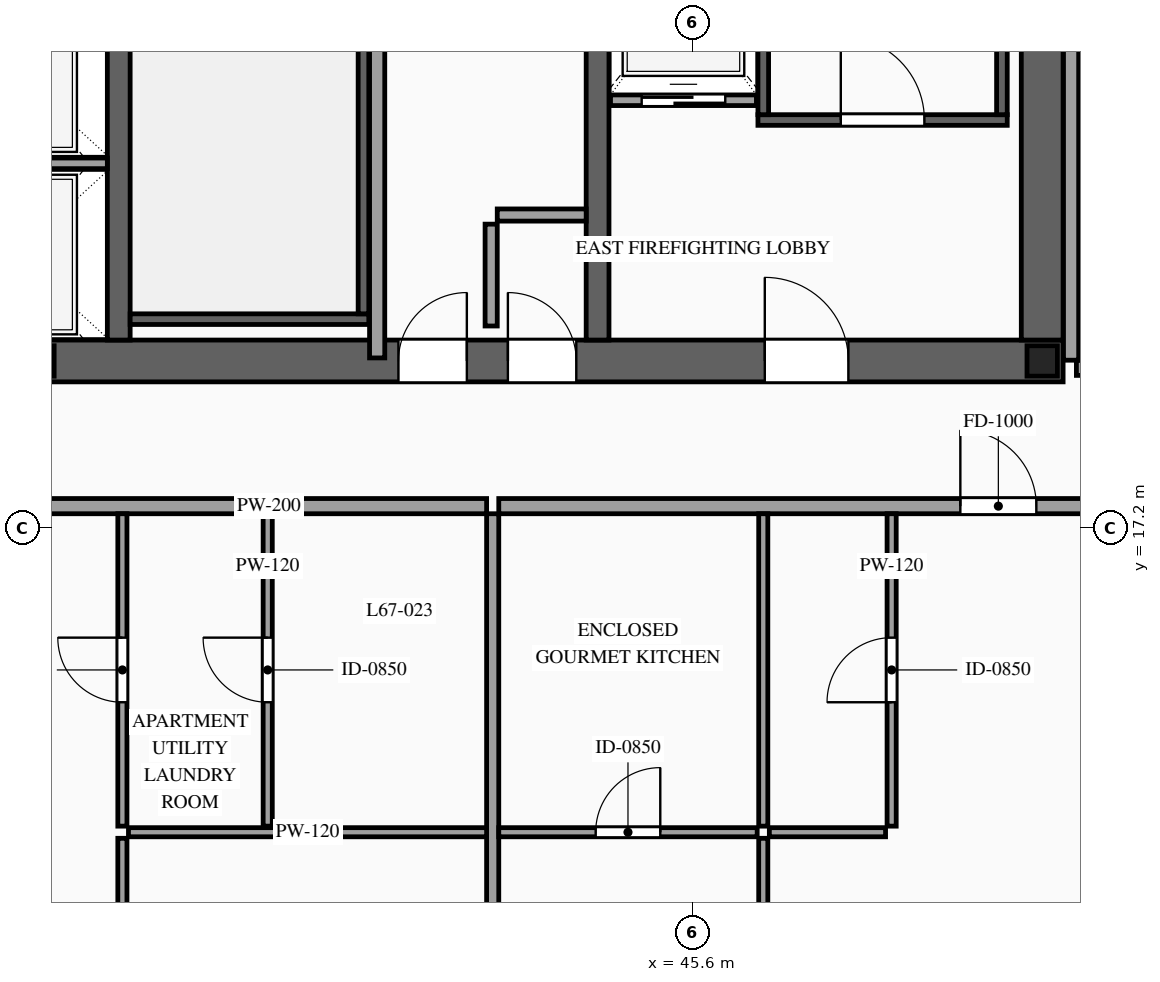
"""IFC4 building model, lengths in metres.
Left out: names, types, materials, properties, quantities, classifications, styles, units other than length and angle.
Written with IfcOpenShell. Run it as: python <this file> out.ifc"""

import sys

from ifc_helpers import new_model, si_unit, direction, frame, frame_2d, origin, origin_2d, place, context, subcontext, project, spatial, rectangle, i_section, extrude, source, transform, mapped, element, fill, save


model = new_model("IFC4")
c1 = context("Model", 3, precision=1e-05, world=origin(), true_north=direction((0.0, 1.0)))
c2 = subcontext(c1, "Body", "Model", "MODEL_VIEW")
j1 = project(units=[si_unit("LENGTHUNIT", "METRE"), si_unit("PLANEANGLEUNIT", "RADIAN")], contexts=[c1])
p1 = place(None, origin())
s1 = spatial("IfcSite", under=j1, at=p1, CompositionType="ELEMENT")
p2 = place(p1, origin())
s2 = spatial("IfcBuilding", under=s1, at=p2, CompositionType="ELEMENT")
p3 = place(p2, frame((0.0, 0.0, 252.1)))
s3 = spatial("IfcBuildingStorey", under=s2, at=p3, CompositionType="ELEMENT", Elevation=252.1)
p4 = place(p3, frame((23.525, 19.4, 0.0), z_axis=(0.0, 0.0, 1.0), x_axis=(1.0, 0.0, 0.0)))
e1 = element("IfcWall", 1, at=p4, inside=s3, PredefinedType="SHEAR", context=c2, shape_type="SweptSolid", body=[
    extrude(rectangle(XDim=26.95, YDim=0.55, at=frame_2d((13.475, 0.0))), origin(), (0.0, 0.0, 1.0), 3.5),
])
p5 = place(p4, frame((1.925, 0.0, 0.0)))
e2 = element("IfcOpeningElement", 2, at=p5, cuts=e1, PredefinedType="OPENING", context=c2, shape_type="SweptSolid", body=[
    extrude(rectangle(XDim=1.1, YDim=2.2, at=frame_2d((0.55, 1.1))), frame((0.0, 0.29, 0.0), z_axis=(0.0, -1.0, 0.0), x_axis=(1.0, 0.0, 0.0)), (0.0, 0.0, 1.0), 0.58),
])
p6 = place(p4, frame((9.825, 0.0, 0.0)))
e3 = element("IfcOpeningElement", 3, at=p6, cuts=e1, PredefinedType="OPENING", context=c2, shape_type="SweptSolid", body=[
    extrude(rectangle(XDim=1.1, YDim=2.2, at=frame_2d((0.55, 1.1))), frame((0.0, 0.29, 0.0), z_axis=(0.0, -1.0, 0.0), x_axis=(1.0, 0.0, 0.0)), (0.0, 0.0, 1.0), 0.58),
])
p7 = place(p4, frame((23.025, 0.0, 0.0)))
e4 = element("IfcOpeningElement", 4, at=p7, cuts=e1, PredefinedType="OPENING", context=c2, shape_type="SweptSolid", body=[
    extrude(rectangle(XDim=1.1, YDim=2.2, at=frame_2d((0.55, 1.1))), frame((0.0, 0.29, 0.0), z_axis=(0.0, -1.0, 0.0), x_axis=(1.0, 0.0, 0.0)), (0.0, 0.0, 1.0), 0.58),
])
p8 = place(p4, frame((19.645, 0.0, 0.0)))
e5 = element("IfcOpeningElement", 5, at=p8, cuts=e1, PredefinedType="OPENING", context=c2, shape_type="SweptSolid", body=[
    extrude(rectangle(XDim=0.9, YDim=2.15, at=frame_2d((0.45, 1.075))), frame((0.0, 0.29, 0.0), z_axis=(0.0, -1.0, 0.0), x_axis=(1.0, 0.0, 0.0)), (0.0, 0.0, 1.0), 0.58),
])
p9 = place(p4, frame((18.205, 0.0, 0.0)))
e6 = element("IfcOpeningElement", 6, at=p9, cuts=e1, PredefinedType="OPENING", context=c2, shape_type="SweptSolid", body=[
    extrude(rectangle(XDim=0.9, YDim=2.15, at=frame_2d((0.45, 1.075))), frame((0.0, 0.29, 0.0), z_axis=(0.0, -1.0, 0.0), x_axis=(1.0, 0.0, 0.0)), (0.0, 0.0, 1.0), 0.58),
])
m1 = source(origin(), c2, "Body", "SweptSolid", [
    extrude(rectangle(XDim=12.25, YDim=0.55, at=frame_2d((6.125, 0.0))), origin(), (0.0, 0.0, 1.0), 3.5),
])
p10 = place(p3, frame((50.2, 19.675, 0.0), z_axis=(0.0, 0.0, 1.0), x_axis=(0.0, 1.0, 0.0)))
e7 = element("IfcWall", 7, at=p10, inside=s3, PredefinedType="SHEAR", context=c2, shape_type="MappedRepresentation", body=[
    mapped(m1, transform((0.0, 0.0, 0.0), scale=1.0)),
])
m2 = source(origin(), c2, "Body", "SweptSolid", [
    extrude(rectangle(XDim=12.25, YDim=0.3, at=frame_2d((6.125, 0.0))), origin(), (0.0, 0.0, 1.0), 3.5),
])
for number, where, z_axis, x_axis in (
    (8, (38.05, 19.675, 0.0), (0.0, 0.0, 1.0), (0.0, 1.0, 0.0)),
    (9, (44.35, 19.675, 0.0), (0.0, 0.0, 1.0), (0.0, 1.0, 0.0)),
):
    element("IfcWall", number, at=place(p3, frame(where, z_axis=z_axis, x_axis=x_axis)), inside=s3, PredefinedType="SOLIDWALL", context=c2, shape_type="MappedRepresentation", body=[
        mapped(m2, transform((0.0, 0.0, 0.0), scale=1.0)),
    ])
m3 = source(origin(), c2, "Body", "SweptSolid", [
    extrude(i_section(OverallWidth=0.4, OverallDepth=0.4, WebThickness=0.013, FlangeThickness=0.021, at=origin_2d()), origin(), (0.0, 0.0, 1.0), 3.5),
])
for number, where, z_axis, x_axis in (
    (10, (37.0, 19.4, 0.0), (0.0, 0.0, 1.0), (1.0, 0.0, 0.0)),
    (11, (50.2, 19.4, 0.0), (0.0, 0.0, 1.0), (1.0, 0.0, 0.0)),
):
    element("IfcColumn", number, at=place(p3, frame(where, z_axis=z_axis, x_axis=x_axis)), inside=s3, PredefinedType="COLUMN", context=c2, shape_type="MappedRepresentation", body=[
        mapped(m3, transform((0.0, 0.0, 0.0), scale=1.0)),
    ])
p11 = place(p3, frame((44.52, 22.83, 0.0), z_axis=(0.0, 0.0, 1.0), x_axis=(1.0, 0.0, 0.0)))
e12 = element("IfcWall", 12, at=p11, inside=s3, PredefinedType="SOLIDWALL", context=c2, shape_type="SweptSolid", body=[
    extrude(rectangle(XDim=1.92, YDim=0.14, at=frame_2d((0.96, 0.0))), origin(), (0.0, 0.0, 1.0), 3.28),
])
p12 = place(p11, frame((0.41, 0.0, 0.0)))
e13 = element("IfcOpeningElement", 13, at=p12, cuts=e12, PredefinedType="OPENING", context=c2, shape_type="SweptSolid", body=[
    extrude(rectangle(XDim=1.1, YDim=2.2, at=frame_2d((0.55, 1.1))), frame((0.0, 0.085, 0.0), z_axis=(0.0, -1.0, 0.0), x_axis=(1.0, 0.0, 0.0)), (0.0, 0.0, 1.0), 0.17),
])
m4 = source(origin(), c2, "Body", "SweptSolid", [
    extrude(rectangle(XDim=2.4, YDim=0.14, at=frame_2d((1.2, 0.0))), origin(), (0.0, 0.0, 1.0), 3.28),
])
p13 = place(p3, frame((35.5, 22.0, 0.0), z_axis=(0.0, 0.0, 1.0), x_axis=(1.0, 0.0, 0.0)))
e14 = element("IfcWall", 14, at=p13, inside=s3, PredefinedType="SOLIDWALL", context=c2, shape_type="MappedRepresentation", body=[
    mapped(m4, transform((0.0, 0.0, 0.0), scale=1.0)),
])
p14 = place(p3, frame((46.46, 22.57, 0.0), z_axis=(0.0, 0.0, 1.0), x_axis=(1.0, 0.0, 0.0)))
e15 = element("IfcWall", 15, at=p14, inside=s3, PredefinedType="SOLIDWALL", context=c2, shape_type="SweptSolid", body=[
    extrude(rectangle(XDim=3.28, YDim=0.14, at=frame_2d((1.64, 0.0))), origin(), (0.0, 0.0, 1.0), 3.28),
])
p15 = place(p14, frame((1.09, 0.0, 0.0)))
e16 = element("IfcOpeningElement", 16, at=p15, cuts=e15, PredefinedType="OPENING", context=c2, shape_type="SweptSolid", body=[
    extrude(rectangle(XDim=1.1, YDim=2.2, at=frame_2d((0.55, 1.1))), frame((0.0, 0.085, 0.0), z_axis=(0.0, -1.0, 0.0), x_axis=(1.0, 0.0, 0.0)), (0.0, 0.0, 1.0), 0.17),
])
m5 = source(origin(), c2, "Body", "SweptSolid", [
    extrude(rectangle(XDim=8.94, YDim=0.14, at=frame_2d((4.47, 0.0))), origin(), (0.0, 0.0, 1.0), 3.28),
])
for number, where, z_axis, x_axis in (
    (17, (46.53, 22.64, 0.0), (0.0, 0.0, 1.0), (0.0, 1.0, 0.0)),
    (18, (49.67, 22.64, 0.0), (0.0, 0.0, 1.0), (0.0, 1.0, 0.0)),
):
    element("IfcWall", number, at=place(p3, frame(where, z_axis=z_axis, x_axis=x_axis)), inside=s3, PredefinedType="SOLIDWALL", context=c2, shape_type="MappedRepresentation", body=[
        mapped(m5, transform((0.0, 0.0, 0.0), scale=1.0)),
    ])
m6 = source(origin(), c2, "Body", "SweptSolid", [
    extrude(rectangle(XDim=3.14, YDim=0.14, at=frame_2d((1.57, 0.0))), origin(), (0.0, 0.0, 1.0), 3.28),
])
p16 = place(p3, frame((38.2, 19.95, 0.0), z_axis=(0.0, 0.0, 1.0), x_axis=(1.0, 0.0, 0.0)))
e19 = element("IfcWall", 19, at=p16, inside=s3, PredefinedType="SOLIDWALL", context=c2, shape_type="MappedRepresentation", body=[
    mapped(m6, transform((0.0, 0.0, 0.0), scale=1.0)),
])
m7 = source(origin(), c2, "Body", "SweptSolid", [
    extrude(rectangle(XDim=8.94, YDim=0.14, at=frame_2d((4.47, 0.0))), origin(), (0.0, 0.0, 1.0), 3.28),
])
p17 = place(p3, frame((41.27, 20.02, 0.0), z_axis=(0.0, 0.0, 1.0), x_axis=(0.0, 1.0, 0.0)))
e20 = element("IfcWall", 20, at=p17, inside=s3, PredefinedType="SOLIDWALL", context=c2, shape_type="MappedRepresentation", body=[
    mapped(m7, transform((0.0, 0.0, 0.0), scale=1.0)),
])
m8 = source(origin(), c2, "Body", "SweptSolid", [
    extrude(rectangle(XDim=1.34, YDim=0.16, at=frame_2d((0.67, 0.0))), origin(), (0.0, 0.0, 1.0), 3.28),
])
p18 = place(p3, frame((42.95, 19.86, 0.0), z_axis=(0.0, 0.0, 1.0), x_axis=(0.0, 1.0, 0.0)))
e21 = element("IfcWall", 21, at=p18, inside=s3, PredefinedType="PARTITIONING", context=c2, shape_type="MappedRepresentation", body=[
    mapped(m8, transform((0.0, 0.0, 0.0), scale=1.0)),
])
m9 = source(origin(), c2, "Body", "SweptSolid", [
    extrude(rectangle(XDim=1.17, YDim=0.16, at=frame_2d((0.585, 0.0))), origin(), (0.0, 0.0, 1.0), 3.28),
])
p19 = place(p3, frame((43.03, 21.32, 0.0), z_axis=(0.0, 0.0, 1.0), x_axis=(1.0, 0.0, 0.0)))
e22 = element("IfcWall", 22, at=p19, inside=s3, PredefinedType="PARTITIONING", context=c2, shape_type="MappedRepresentation", body=[
    mapped(m9, transform((0.0, 0.0, 0.0), scale=1.0)),
])
m10 = source(origin(), c2, "Body", "SweptSolid", [
    extrude(rectangle(XDim=12.72, YDim=0.2, at=frame_2d((6.36, 0.0))), origin(), (0.0, 0.0, 1.0), 3.28),
])
p20 = place(p3, frame((41.45, 19.44, 0.0), z_axis=(0.0, 0.0, 1.0), x_axis=(0.0, 1.0, 0.0)))
e23 = element("IfcWall", 23, at=p20, inside=s3, PredefinedType="PARTITIONING", context=c2, shape_type="MappedRepresentation", body=[
    mapped(m10, transform((0.0, 0.0, 0.0), scale=1.0)),
])
p21 = place(p3, frame((31.11, 17.49, 0.0), z_axis=(0.0, 0.0, 1.0), x_axis=(1.0, 0.0, 0.0)))
e24 = element("IfcWall", 24, at=p21, inside=s3, PredefinedType="PARTITIONING", context=c2, shape_type="SweptSolid", body=[
    extrude(rectangle(XDim=11.78, YDim=0.2, at=frame_2d((5.89, 0.0))), origin(), (0.0, 0.0, 1.0), 3.28),
])
p22 = place(p21, frame((4.801, 0.0, 0.0)))
e25 = element("IfcOpeningElement", 25, at=p22, cuts=e24, PredefinedType="OPENING", context=c2, shape_type="SweptSolid", body=[
    extrude(rectangle(XDim=1.0, YDim=2.2, at=frame_2d((0.5, 1.1))), frame((0.0, 0.115, 0.0), z_axis=(0.0, -1.0, 0.0), x_axis=(1.0, 0.0, 0.0)), (0.0, 0.0, 1.0), 0.23),
])
m11 = source(origin(), c2, "Body", "SweptSolid", [
    extrude(rectangle(XDim=12.04, YDim=0.16, at=frame_2d((6.02, 0.0))), origin(), (0.0, 0.0, 1.0), 3.28),
])
p23 = place(p3, frame((42.97, 5.35, 0.0), z_axis=(0.0, 0.0, 1.0), x_axis=(0.0, 1.0, 0.0)))
e26 = element("IfcWall", 26, at=p23, inside=s3, PredefinedType="PARTITIONING", context=c2, shape_type="MappedRepresentation", body=[
    mapped(m11, transform((0.0, 0.0, 0.0), scale=1.0)),
])
p24 = place(p3, frame((40.01, 13.28, 0.0), z_axis=(0.0, 0.0, 1.0), x_axis=(0.0, 1.0, 0.0)))
e27 = element("IfcWall", 27, at=p24, inside=s3, PredefinedType="PARTITIONING", context=c2, shape_type="SweptSolid", body=[
    extrude(rectangle(XDim=4.11, YDim=0.12, at=frame_2d((2.055, 0.0))), origin(), (0.0, 0.0, 1.0), 3.28),
])
p25 = place(p24, frame((1.63, 0.0, 0.0)))
e28 = element("IfcOpeningElement", 28, at=p25, cuts=e27, PredefinedType="OPENING", context=c2, shape_type="SweptSolid", body=[
    extrude(rectangle(XDim=0.85, YDim=2.1, at=frame_2d((0.425, 1.05))), frame((0.0, 0.075, 0.0), z_axis=(0.0, -1.0, 0.0), x_axis=(1.0, 0.0, 0.0)), (0.0, 0.0, 1.0), 0.15),
])
m12 = source(origin(), c2, "Body", "SweptSolid", [
    extrude(rectangle(XDim=4.712, YDim=0.12, at=frame_2d((2.356, 0.0))), origin(), (0.0, 0.0, 1.0), 3.28),
])
p26 = place(p3, frame((38.178, 13.2, 0.0), z_axis=(0.0, 0.0, 1.0), x_axis=(1.0, 0.0, 0.0)))
e29 = element("IfcWall", 29, at=p26, inside=s3, PredefinedType="PARTITIONING", context=c2, shape_type="MappedRepresentation", body=[
    mapped(m12, transform((0.0, 0.0, 0.0), scale=1.0)),
])
p27 = place(p3, frame((38.098, 5.35, 0.0), z_axis=(0.0, 0.0, 1.0), x_axis=(0.0, 1.0, 0.0)))
e30 = element("IfcWall", 30, at=p27, inside=s3, PredefinedType="PARTITIONING", context=c2, shape_type="SweptSolid", body=[
    extrude(rectangle(XDim=7.77, YDim=0.12, at=frame_2d((3.885, 0.0))), origin(), (0.0, 0.0, 1.0), 3.28),
])
p28 = place(p27, frame((3.435, 0.0, 0.0)))
e31 = element("IfcOpeningElement", 31, at=p28, cuts=e30, PredefinedType="OPENING", context=c2, shape_type="SweptSolid", body=[
    extrude(rectangle(XDim=0.9, YDim=2.15, at=frame_2d((0.45, 1.075))), frame((0.0, 0.075, 0.0), z_axis=(0.0, -1.0, 0.0), x_axis=(1.0, 0.0, 0.0)), (0.0, 0.0, 1.0), 0.15),
])
p29 = place(p3, frame((38.098, 13.28, 0.0), z_axis=(0.0, 0.0, 1.0), x_axis=(0.0, 1.0, 0.0)))
e32 = element("IfcWall", 32, at=p29, inside=s3, PredefinedType="PARTITIONING", context=c2, shape_type="SweptSolid", body=[
    extrude(rectangle(XDim=4.11, YDim=0.12, at=frame_2d((2.055, 0.0))), origin(), (0.0, 0.0, 1.0), 3.28),
])
p30 = place(p29, frame((1.63, 0.0, 0.0)))
e33 = element("IfcOpeningElement", 33, at=p30, cuts=e32, PredefinedType="OPENING", context=c2, shape_type="SweptSolid", body=[
    extrude(rectangle(XDim=0.85, YDim=2.1, at=frame_2d((0.425, 1.05))), frame((0.0, 0.075, 0.0), z_axis=(0.0, -1.0, 0.0), x_axis=(1.0, 0.0, 0.0)), (0.0, 0.0, 1.0), 0.15),
])
p31 = place(p3, frame((43.05, 17.49, 0.0), z_axis=(0.0, 0.0, 1.0), x_axis=(1.0, 0.0, 0.0)))
e34 = element("IfcWall", 34, at=p31, inside=s3, PredefinedType="PARTITIONING", context=c2, shape_type="SweptSolid", body=[
    extrude(rectangle(XDim=11.51, YDim=0.2, at=frame_2d((5.755, 0.0))), origin(), (0.0, 0.0, 1.0), 3.28),
])
p32 = place(p31, frame((6.073, 0.0, 0.0)))
e35 = element("IfcOpeningElement", 35, at=p32, cuts=e34, PredefinedType="OPENING", context=c2, shape_type="SweptSolid", body=[
    extrude(rectangle(XDim=1.0, YDim=2.2, at=frame_2d((0.5, 1.1))), frame((0.0, 0.115, 0.0), z_axis=(0.0, -1.0, 0.0), x_axis=(1.0, 0.0, 0.0)), (0.0, 0.0, 1.0), 0.23),
])
p33 = place(p3, frame((43.05, 13.2, 0.0), z_axis=(0.0, 0.0, 1.0), x_axis=(1.0, 0.0, 0.0)))
e36 = element("IfcWall", 36, at=p33, inside=s3, PredefinedType="PARTITIONING", context=c2, shape_type="SweptSolid", body=[
    extrude(rectangle(XDim=3.4, YDim=0.12, at=frame_2d((1.7, 0.0))), origin(), (0.0, 0.0, 1.0), 3.28),
])
p34 = place(p33, frame((1.275, 0.0, 0.0)))
e37 = element("IfcOpeningElement", 37, at=p34, cuts=e36, PredefinedType="OPENING", context=c2, shape_type="SweptSolid", body=[
    extrude(rectangle(XDim=0.85, YDim=2.1, at=frame_2d((0.425, 1.05))), frame((0.0, 0.075, 0.0), z_axis=(0.0, -1.0, 0.0), x_axis=(1.0, 0.0, 0.0)), (0.0, 0.0, 1.0), 0.15),
])
m13 = source(origin(), c2, "Body", "SweptSolid", [
    extrude(rectangle(XDim=4.11, YDim=0.12, at=frame_2d((2.055, 0.0))), origin(), (0.0, 0.0, 1.0), 3.28),
])
p35 = place(p3, frame((46.53, 13.28, 0.0), z_axis=(0.0, 0.0, 1.0), x_axis=(0.0, 1.0, 0.0)))
e38 = element("IfcWall", 38, at=p35, inside=s3, PredefinedType="PARTITIONING", context=c2, shape_type="MappedRepresentation", body=[
    mapped(m13, transform((0.0, 0.0, 0.0), scale=1.0)),
])
m14 = source(origin(), c2, "Body", "SweptSolid", [
    extrude(rectangle(XDim=1.529, YDim=0.12, at=frame_2d((0.764, 0.0))), origin(), (0.0, 0.0, 1.0), 3.28),
])
p36 = place(p3, frame((46.61, 13.2, 0.0), z_axis=(0.0, 0.0, 1.0), x_axis=(1.0, 0.0, 0.0)))
e39 = element("IfcWall", 39, at=p36, inside=s3, PredefinedType="PARTITIONING", context=c2, shape_type="MappedRepresentation", body=[
    mapped(m14, transform((0.0, 0.0, 0.0), scale=1.0)),
])
p37 = place(p3, frame((48.219, 13.28, 0.0), z_axis=(0.0, 0.0, 1.0), x_axis=(0.0, 1.0, 0.0)))
e40 = element("IfcWall", 40, at=p37, inside=s3, PredefinedType="PARTITIONING", context=c2, shape_type="SweptSolid", body=[
    extrude(rectangle(XDim=4.11, YDim=0.12, at=frame_2d((2.055, 0.0))), origin(), (0.0, 0.0, 1.0), 3.28),
])
p38 = place(p37, frame((1.63, 0.0, 0.0)))
e41 = element("IfcOpeningElement", 41, at=p38, cuts=e40, PredefinedType="OPENING", context=c2, shape_type="SweptSolid", body=[
    extrude(rectangle(XDim=0.85, YDim=2.1, at=frame_2d((0.425, 1.05))), frame((0.0, 0.075, 0.0), z_axis=(0.0, -1.0, 0.0), x_axis=(1.0, 0.0, 0.0)), (0.0, 0.0, 1.0), 0.15),
])
p39 = place(p3, frame((46.53, 5.35, 0.0), z_axis=(0.0, 0.0, 1.0), x_axis=(0.0, 1.0, 0.0)))
e42 = element("IfcWall", 42, at=p39, inside=s3, PredefinedType="PARTITIONING", context=c2, shape_type="SweptSolid", body=[
    extrude(rectangle(XDim=7.77, YDim=0.12, at=frame_2d((3.885, 0.0))), origin(), (0.0, 0.0, 1.0), 3.28),
])
p40 = place(p39, frame((3.435, 0.0, 0.0)))
e43 = element("IfcOpeningElement", 43, at=p40, cuts=e42, PredefinedType="OPENING", context=c2, shape_type="SweptSolid", body=[
    extrude(rectangle(XDim=0.9, YDim=2.15, at=frame_2d((0.45, 1.075))), frame((0.0, 0.075, 0.0), z_axis=(0.0, -1.0, 0.0), x_axis=(1.0, 0.0, 0.0)), (0.0, 0.0, 1.0), 0.15),
])
p41 = place(p3, frame((50.65, 19.31, 0.0), z_axis=(0.0, 0.0, 1.0), x_axis=(1.0, 0.0, 0.0)))
e44 = element("IfcWall", 44, at=p41, inside=s3, PredefinedType="PARTITIONING", context=c2, shape_type="SweptSolid", body=[
    extrude(rectangle(XDim=6.8, YDim=0.2, at=frame_2d((3.4, 0.0))), origin(), (0.0, 0.0, 1.0), 2.825),
])
p42 = place(p41, frame((2.8, 0.0, 0.0)))
e45 = element("IfcOpeningElement", 45, at=p42, cuts=e44, PredefinedType="OPENING", context=c2, shape_type="SweptSolid", body=[
    extrude(rectangle(XDim=1.0, YDim=2.2, at=frame_2d((0.5, 1.1))), frame((0.0, 0.115, 0.0), z_axis=(0.0, -1.0, 0.0), x_axis=(1.0, 0.0, 0.0)), (0.0, 0.0, 1.0), 0.23),
])
m15 = source(origin(), c2, "Body", "SweptSolid", [
    extrude(rectangle(XDim=6.29, YDim=0.2, at=frame_2d((3.145, 0.0))), origin(), (0.0, 0.0, 1.0), 3.28),
])
p43 = place(p3, frame((50.58, 19.41, 0.0), z_axis=(0.0, 0.0, 1.0), x_axis=(0.0, 1.0, 0.0)))
e46 = element("IfcWall", 46, at=p43, inside=s3, PredefinedType="PARTITIONING", context=c2, shape_type="MappedRepresentation", body=[
    mapped(m15, transform((0.0, 0.0, 0.0), scale=1.0)),
])
m16 = source(origin(), c2, "Body", "SweptSolid", [
    extrude(rectangle(XDim=1.1, YDim=2.2, at=frame_2d((0.55, 1.1))), frame((0.0, 0.025, 0.0), z_axis=(0.0, -1.0, 0.0), x_axis=(1.0, 0.0, 0.0)), (0.0, 0.0, 1.0), 0.05),
])
p44 = place(p12, origin())
e47 = element("IfcDoor", 47, at=p44, inside=s3, OperationType="SLIDING_TO_RIGHT", PredefinedType="DOOR", context=c2, shape_type="MappedRepresentation", body=[
    mapped(m16, transform((0.0, 0.0, 0.0), scale=1.0)),
])
fill(e13, e47)
m17 = source(origin(), c2, "Body", "SweptSolid", [
    extrude(rectangle(XDim=1.1, YDim=2.2, at=frame_2d((0.55, 1.1))), frame((0.0, 0.025, 0.0), z_axis=(0.0, -1.0, 0.0), x_axis=(1.0, 0.0, 0.0)), (0.0, 0.0, 1.0), 0.05),
])
p45 = place(p15, origin())
e48 = element("IfcDoor", 48, at=p45, inside=s3, OperationType="SINGLE_SWING_LEFT", PredefinedType="DOOR", context=c2, shape_type="MappedRepresentation", body=[
    mapped(m17, transform((0.0, 0.0, 0.0), scale=1.0)),
])
fill(e16, e48)
p46 = place(p7, origin())
e49 = element("IfcDoor", 49, at=p46, inside=s3, OperationType="SINGLE_SWING_LEFT", PredefinedType="DOOR", context=c2, shape_type="MappedRepresentation", body=[
    mapped(m17, transform((0.0, 0.0, 0.0), scale=1.0)),
])
fill(e4, e49)
m18 = source(origin(), c2, "Body", "SweptSolid", [
    extrude(rectangle(XDim=0.9, YDim=2.15, at=frame_2d((0.45, 1.075))), frame((0.0, 0.025, 0.0), z_axis=(0.0, -1.0, 0.0), x_axis=(1.0, 0.0, 0.0)), (0.0, 0.0, 1.0), 0.05),
])
p47 = place(p8, origin())
e50 = element("IfcDoor", 50, at=p47, inside=s3, OperationType="SINGLE_SWING_LEFT", PredefinedType="DOOR", context=c2, shape_type="MappedRepresentation", body=[
    mapped(m18, transform((0.0, 0.0, 0.0), scale=1.0)),
])
fill(e5, e50)
p48 = place(p9, origin())
e51 = element("IfcDoor", 51, at=p48, inside=s3, OperationType="SINGLE_SWING_RIGHT", PredefinedType="DOOR", context=c2, shape_type="MappedRepresentation", body=[
    mapped(m18, transform((0.0, 0.0, 0.0), scale=1.0)),
])
fill(e6, e51)
m19 = source(origin(), c2, "Body", "SweptSolid", [
    extrude(rectangle(XDim=0.85, YDim=2.1, at=frame_2d((0.425, 1.05))), frame((0.0, 0.025, 0.0), z_axis=(0.0, -1.0, 0.0), x_axis=(1.0, 0.0, 0.0)), (0.0, 0.0, 1.0), 0.05),
])
p49 = place(p25, origin())
e52 = element("IfcDoor", 52, at=p49, inside=s3, OperationType="SINGLE_SWING_RIGHT", PredefinedType="DOOR", context=c2, shape_type="MappedRepresentation", body=[
    mapped(m19, transform((0.0, 0.0, 0.0), scale=1.0)),
])
fill(e28, e52)
p50 = place(p30, origin())
e53 = element("IfcDoor", 53, at=p50, inside=s3, OperationType="SINGLE_SWING_RIGHT", PredefinedType="DOOR", context=c2, shape_type="MappedRepresentation", body=[
    mapped(m19, transform((0.0, 0.0, 0.0), scale=1.0)),
])
fill(e33, e53)
m20 = source(origin(), c2, "Body", "SweptSolid", [
    extrude(rectangle(XDim=1.0, YDim=2.2, at=frame_2d((0.5, 1.1))), frame((0.0, 0.025, 0.0), z_axis=(0.0, -1.0, 0.0), x_axis=(1.0, 0.0, 0.0)), (0.0, 0.0, 1.0), 0.05),
])
p51 = place(p32, origin())
e54 = element("IfcDoor", 54, at=p51, inside=s3, OperationType="SINGLE_SWING_LEFT", PredefinedType="DOOR", context=c2, shape_type="MappedRepresentation", body=[
    mapped(m20, transform((0.0, 0.0, 0.0), scale=1.0)),
])
fill(e35, e54)
p52 = place(p34, origin())
e55 = element("IfcDoor", 55, at=p52, inside=s3, OperationType="SINGLE_SWING_RIGHT", PredefinedType="DOOR", context=c2, shape_type="MappedRepresentation", body=[
    mapped(m19, transform((0.0, 0.0, 0.0), scale=1.0)),
])
fill(e37, e55)
p53 = place(p38, origin())
e56 = element("IfcDoor", 56, at=p53, inside=s3, OperationType="SINGLE_SWING_LEFT", PredefinedType="DOOR", context=c2, shape_type="MappedRepresentation", body=[
    mapped(m19, transform((0.0, 0.0, 0.0), scale=1.0)),
])
fill(e41, e56)
save(model, sys.argv[1])
